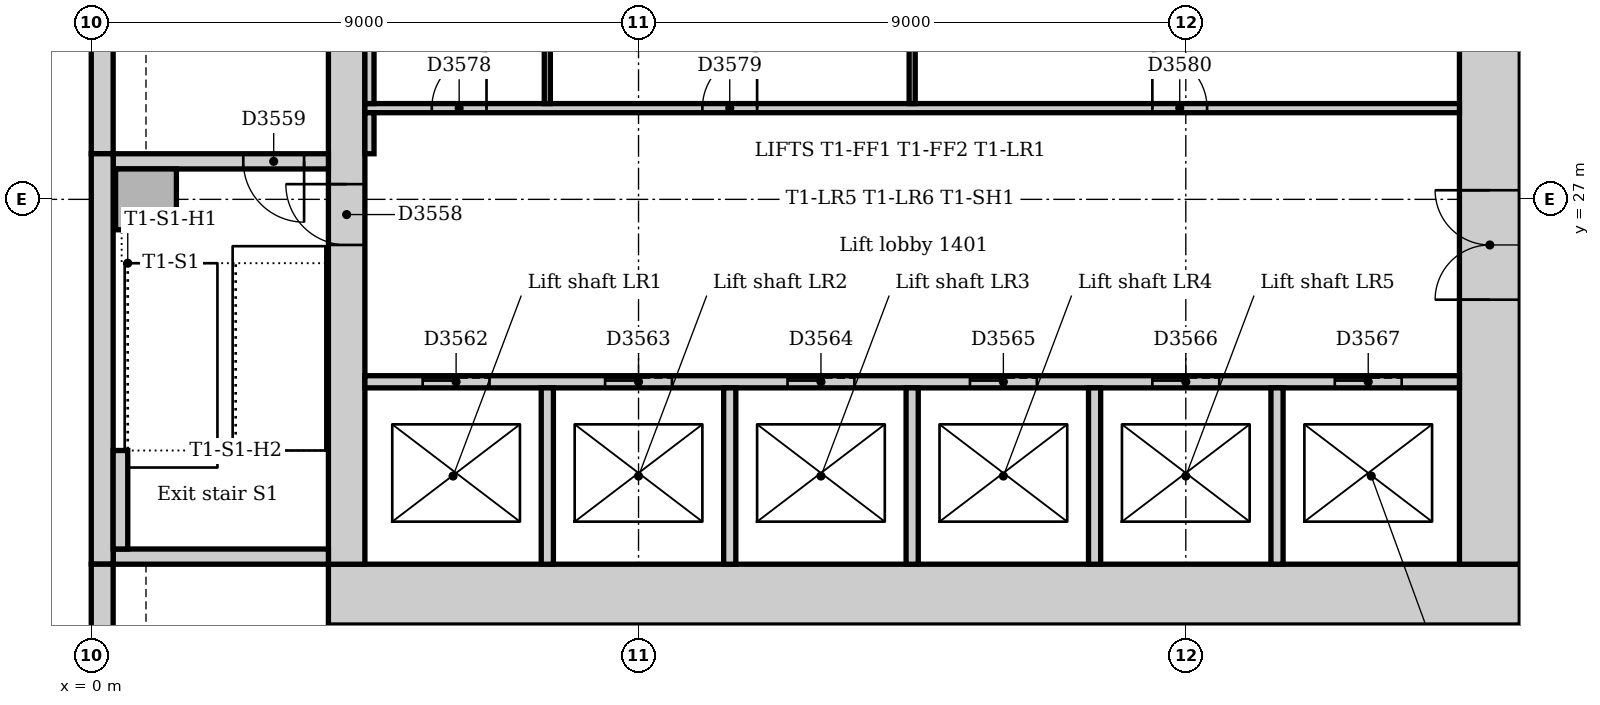
"""IFC4 building model, lengths in metres.
Left out: names, types, materials, properties, quantities, classifications, styles, units other than length and angle.
Written with IfcOpenShell. Run it as: python <this file> out.ifc"""

import sys

from ifc_helpers import new_model, si_unit, direction, frame, frame_2d, origin, origin_2d, place, context, subcontext, project, spatial, rectangle, extrude, element, fill, save


model = new_model("IFC4")
c1 = context("Model", 3, precision=1e-05, world=origin(), true_north=direction((0.0, 1.0)))
c2 = subcontext(c1, "Body", "Model", "MODEL_VIEW")
j1 = project(units=[si_unit("LENGTHUNIT", "METRE"), si_unit("PLANEANGLEUNIT", "RADIAN")], contexts=[c1])
p1 = place(None, origin())
s1 = spatial("IfcSite", under=j1, at=p1, CompositionType="ELEMENT")
p2 = place(p1, origin())
s2 = spatial("IfcBuilding", under=s1, at=p2, CompositionType="ELEMENT")
p3 = place(p2, frame((0.0, 0.0, 63.0)))
s3 = spatial("IfcBuildingStorey", under=s2, at=p3, CompositionType="ELEMENT", Elevation=63.0)
p4 = place(p3, frame((3.9, 20.5, 0.0), z_axis=(0.0, 0.0, 1.0), x_axis=(1.0, 0.0, 0.0)))
e1 = element("IfcWall", 1, at=p4, inside=s3, PredefinedType="SOLIDWALL", context=c2, shape_type="SweptSolid", body=[
    extrude(rectangle(XDim=19.6, YDim=1.0, at=frame_2d((9.8, 0.0))), origin(), (0.0, 0.0, 1.0), 4.0),
])
p5 = place(p3, frame((23.0, 21.0, 0.0), z_axis=(0.0, 0.0, 1.0), x_axis=(0.0, 1.0, 0.0)))
e2 = element("IfcWall", 2, at=p5, inside=s3, PredefinedType="SOLIDWALL", context=c2, shape_type="SweptSolid", body=[
    extrude(rectangle(XDim=10.5, YDim=1.0, at=frame_2d((5.25, 0.0))), origin(), (0.0, 0.0, 1.0), 4.0),
])
p6 = place(p5, frame((4.35, 0.0, 0.0)))
e3 = element("IfcOpeningElement", 3, at=p6, cuts=e2, PredefinedType="OPENING", context=c2, shape_type="SweptSolid", body=[
    extrude(rectangle(XDim=1.8, YDim=2.1, at=frame_2d((0.9, 1.05))), frame((0.0, 0.51, 0.0), z_axis=(0.0, -1.0, 0.0), x_axis=(1.0, 0.0, 0.0)), (0.0, 0.0, 1.0), 1.02),
])
p7 = place(p3, frame((4.2, 31.5, 0.0), z_axis=(0.0, 0.0, 1.0), x_axis=(0.0, -1.0, 0.0)))
e4 = element("IfcWall", 4, at=p7, inside=s3, PredefinedType="SOLIDWALL", context=c2, shape_type="SweptSolid", body=[
    extrude(rectangle(XDim=10.5, YDim=0.6, at=frame_2d((5.25, 0.0))), origin(), (0.0, 0.0, 1.0), 4.0),
])
p8 = place(p7, frame((4.25, 0.0, 0.0)))
e5 = element("IfcOpeningElement", 5, at=p8, cuts=e4, PredefinedType="OPENING", context=c2, shape_type="SweptSolid", body=[
    extrude(rectangle(XDim=1.0, YDim=2.1, at=frame_2d((0.5, 1.05))), frame((0.0, 0.31, 0.0), z_axis=(0.0, -1.0, 0.0), x_axis=(1.0, 0.0, 0.0)), (0.0, 0.0, 1.0), 0.62),
])
p9 = place(p3, frame((0.36, 21.125, 0.0), z_axis=(0.0, 0.0, 1.0), x_axis=(1.0, 0.0, 0.0)))
e6 = element("IfcWall", 6, at=p9, inside=s3, PredefinedType="SOLIDWALL", context=c2, shape_type="SweptSolid", body=[
    extrude(rectangle(XDim=3.54, YDim=0.25, at=frame_2d((1.77, 0.0))), origin(), (0.0, 0.0, 1.0), 4.0),
])
p10 = place(p3, frame((3.9, 27.625, 0.0), z_axis=(0.0, 0.0, 1.0), x_axis=(-1.0, 0.0, 0.0)))
e7 = element("IfcWall", 7, at=p10, inside=s3, PredefinedType="SOLIDWALL", context=c2, shape_type="SweptSolid", body=[
    extrude(rectangle(XDim=3.54, YDim=0.25, at=frame_2d((1.77, 0.0))), origin(), (0.0, 0.0, 1.0), 4.0),
])
p11 = place(p10, frame((0.4, 0.0, 0.0)))
e8 = element("IfcOpeningElement", 8, at=p11, cuts=e7, PredefinedType="OPENING", context=c2, shape_type="SweptSolid", body=[
    extrude(rectangle(XDim=1.0, YDim=2.1, at=frame_2d((0.5, 1.05))), frame((0.0, 0.135, 0.0), z_axis=(0.0, -1.0, 0.0), x_axis=(1.0, 0.0, 0.0)), (0.0, 0.0, 1.0), 0.27),
])
p12 = place(p3, frame((0.9, 27.0, 0.0), z_axis=(0.0, 0.0, 1.0), x_axis=(1.0, 0.0, 0.0)))
e9 = element("IfcColumn", 9, at=p12, inside=s3, PredefinedType="COLUMN", context=c2, shape_type="SweptSolid", body=[
    extrude(rectangle(XDim=1.0, YDim=1.0, at=origin_2d()), origin(), (0.0, 0.0, 1.0), 4.0),
])
p13 = place(p3, frame((0.18, 35.25, 0.0), z_axis=(0.0, 0.0, 1.0), x_axis=(0.0, -1.0, 0.0)))
e10 = element("IfcWall", 10, at=p13, inside=s3, PredefinedType="STANDARD", context=c2, shape_type="SweptSolid", body=[
    extrude(rectangle(XDim=7.5, YDim=0.36, at=frame_2d((3.75, 0.0))), origin(), (0.0, 0.0, 1.0), 3.85),
])
p14 = place(p3, frame((0.18, 27.75, 0.0), z_axis=(0.0, 0.0, 1.0), x_axis=(0.0, -1.0, 0.0)))
e11 = element("IfcWall", 11, at=p14, inside=s3, PredefinedType="STANDARD", context=c2, shape_type="SweptSolid", body=[
    extrude(rectangle(XDim=6.75, YDim=0.36, at=frame_2d((3.375, 0.0))), origin(), (0.0, 0.0, 1.0), 3.85),
])
p15 = place(p3, frame((0.18, 21.0, 0.0), z_axis=(0.0, 0.0, 1.0), x_axis=(0.0, -1.0, 0.0)))
e12 = element("IfcWall", 12, at=p15, inside=s3, PredefinedType="STANDARD", context=c2, shape_type="SweptSolid", body=[
    extrude(rectangle(XDim=16.757, YDim=0.36, at=frame_2d((8.379, 0.0))), origin(), (0.0, 0.0, 1.0), 3.85),
])
p16 = place(p15, frame((1.35, 0.0, 0.9)))
e13 = element("IfcOpeningElement", 13, at=p16, cuts=e12, PredefinedType="OPENING", context=c2, shape_type="SweptSolid", body=[
    extrude(rectangle(XDim=3.3, YDim=1.6, at=frame_2d((1.65, 0.8))), frame((0.0, 0.19, 0.0), z_axis=(0.0, -1.0, 0.0), x_axis=(1.0, 0.0, 0.0)), (0.0, 0.0, 1.0), 0.38),
])
p17 = place(p15, frame((5.85, 0.0, 0.9)))
e14 = element("IfcOpeningElement", 14, at=p17, cuts=e12, PredefinedType="OPENING", context=c2, shape_type="SweptSolid", body=[
    extrude(rectangle(XDim=3.3, YDim=1.6, at=frame_2d((1.65, 0.8))), frame((0.0, 0.19, 0.0), z_axis=(0.0, -1.0, 0.0), x_axis=(1.0, 0.0, 0.0)), (0.0, 0.0, 1.0), 0.38),
])
p18 = place(p15, frame((10.35, 0.0, 0.9)))
e15 = element("IfcOpeningElement", 15, at=p18, cuts=e12, PredefinedType="OPENING", context=c2, shape_type="SweptSolid", body=[
    extrude(rectangle(XDim=3.3, YDim=1.6, at=frame_2d((1.65, 0.8))), frame((0.0, 0.19, 0.0), z_axis=(0.0, -1.0, 0.0), x_axis=(1.0, 0.0, 0.0)), (0.0, 0.0, 1.0), 0.38),
])
p19 = place(p3, frame((0.48, 21.25, 0.0), z_axis=(0.0, 0.0, 1.0), x_axis=(0.0, 1.0, 0.0)))
e16 = element("IfcWall", 16, at=p19, inside=s3, PredefinedType="STANDARD", context=c2, shape_type="SweptSolid", body=[
    extrude(rectangle(XDim=1.62, YDim=0.24, at=frame_2d((0.81, 0.0))), origin(), (0.0, 0.0, 1.0), 4.0),
])
p20 = place(p3, frame((4.5, 24.0, 0.0), z_axis=(0.0, 0.0, 1.0), x_axis=(1.0, 0.0, 0.0)))
e17 = element("IfcWall", 17, at=p20, inside=s3, PredefinedType="PARTITIONING", context=c2, shape_type="SweptSolid", body=[
    extrude(rectangle(XDim=18.0, YDim=0.2, at=frame_2d((9.0, 0.0))), origin(), (0.0, 0.0, 1.0), 3.85),
])
p21 = place(p20, frame((0.95, 0.0, 0.0)))
e18 = element("IfcOpeningElement", 18, at=p21, cuts=e17, PredefinedType="OPENING", context=c2, shape_type="SweptSolid", body=[
    extrude(rectangle(XDim=1.1, YDim=2.1, at=frame_2d((0.55, 1.05))), frame((0.0, 0.11, 0.0), z_axis=(0.0, -1.0, 0.0), x_axis=(1.0, 0.0, 0.0)), (0.0, 0.0, 1.0), 0.22),
])
p22 = place(p20, frame((3.95, 0.0, 0.0)))
e19 = element("IfcOpeningElement", 19, at=p22, cuts=e17, PredefinedType="OPENING", context=c2, shape_type="SweptSolid", body=[
    extrude(rectangle(XDim=1.1, YDim=2.1, at=frame_2d((0.55, 1.05))), frame((0.0, 0.11, 0.0), z_axis=(0.0, -1.0, 0.0), x_axis=(1.0, 0.0, 0.0)), (0.0, 0.0, 1.0), 0.22),
])
p23 = place(p20, frame((6.95, 0.0, 0.0)))
e20 = element("IfcOpeningElement", 20, at=p23, cuts=e17, PredefinedType="OPENING", context=c2, shape_type="SweptSolid", body=[
    extrude(rectangle(XDim=1.1, YDim=2.1, at=frame_2d((0.55, 1.05))), frame((0.0, 0.11, 0.0), z_axis=(0.0, -1.0, 0.0), x_axis=(1.0, 0.0, 0.0)), (0.0, 0.0, 1.0), 0.22),
])
p24 = place(p20, frame((9.95, 0.0, 0.0)))
e21 = element("IfcOpeningElement", 21, at=p24, cuts=e17, PredefinedType="OPENING", context=c2, shape_type="SweptSolid", body=[
    extrude(rectangle(XDim=1.1, YDim=2.1, at=frame_2d((0.55, 1.05))), frame((0.0, 0.11, 0.0), z_axis=(0.0, -1.0, 0.0), x_axis=(1.0, 0.0, 0.0)), (0.0, 0.0, 1.0), 0.22),
])
p25 = place(p20, frame((12.95, 0.0, 0.0)))
e22 = element("IfcOpeningElement", 22, at=p25, cuts=e17, PredefinedType="OPENING", context=c2, shape_type="SweptSolid", body=[
    extrude(rectangle(XDim=1.1, YDim=2.1, at=frame_2d((0.55, 1.05))), frame((0.0, 0.11, 0.0), z_axis=(0.0, -1.0, 0.0), x_axis=(1.0, 0.0, 0.0)), (0.0, 0.0, 1.0), 0.22),
])
p26 = place(p20, frame((15.95, 0.0, 0.0)))
e23 = element("IfcOpeningElement", 23, at=p26, cuts=e17, PredefinedType="OPENING", context=c2, shape_type="SweptSolid", body=[
    extrude(rectangle(XDim=1.1, YDim=2.1, at=frame_2d((0.55, 1.05))), frame((0.0, 0.11, 0.0), z_axis=(0.0, -1.0, 0.0), x_axis=(1.0, 0.0, 0.0)), (0.0, 0.0, 1.0), 0.22),
])
for number, where, z_axis, x_axis in (
    (24, (7.5, 21.0, 0.0), (0.0, 0.0, 1.0), (0.0, 1.0, 0.0)),
    (25, (10.5, 21.0, 0.0), (0.0, 0.0, 1.0), (0.0, 1.0, 0.0)),
    (26, (13.5, 21.0, 0.0), (0.0, 0.0, 1.0), (0.0, 1.0, 0.0)),
    (27, (16.5, 21.0, 0.0), (0.0, 0.0, 1.0), (0.0, 1.0, 0.0)),
    (28, (19.5, 21.0, 0.0), (0.0, 0.0, 1.0), (0.0, 1.0, 0.0)),
):
    element("IfcWall", number, at=place(p3, frame(where, z_axis=z_axis, x_axis=x_axis)), inside=s3, PredefinedType="PARTITIONING", context=c2, shape_type="SweptSolid", body=[
        extrude(rectangle(XDim=2.9, YDim=0.2, at=frame_2d((1.45, 0.0))), origin(), (0.0, 0.0, 1.0), 3.85),
    ])
p27 = place(p3, frame((4.5, 28.5, 0.0), z_axis=(0.0, 0.0, 1.0), x_axis=(1.0, 0.0, 0.0)))
e29 = element("IfcWall", 29, at=p27, inside=s3, PredefinedType="PARTITIONING", context=c2, shape_type="SweptSolid", body=[
    extrude(rectangle(XDim=18.0, YDim=0.15, at=frame_2d((9.0, 0.0))), origin(), (0.0, 0.0, 1.0), 3.85),
])
p28 = place(p27, frame((1.1, 0.0, 0.0)))
e30 = element("IfcOpeningElement", 30, at=p28, cuts=e29, PredefinedType="OPENING", context=c2, shape_type="SweptSolid", body=[
    extrude(rectangle(XDim=0.9, YDim=2.1, at=frame_2d((0.45, 1.05))), frame((0.0, 0.085, 0.0), z_axis=(0.0, -1.0, 0.0), x_axis=(1.0, 0.0, 0.0)), (0.0, 0.0, 1.0), 0.17),
])
p29 = place(p27, frame((5.55, 0.0, 0.0)))
e31 = element("IfcOpeningElement", 31, at=p29, cuts=e29, PredefinedType="OPENING", context=c2, shape_type="SweptSolid", body=[
    extrude(rectangle(XDim=0.9, YDim=2.1, at=frame_2d((0.45, 1.05))), frame((0.0, 0.085, 0.0), z_axis=(0.0, -1.0, 0.0), x_axis=(1.0, 0.0, 0.0)), (0.0, 0.0, 1.0), 0.17),
])
p30 = place(p27, frame((12.95, 0.0, 0.0)))
e32 = element("IfcOpeningElement", 32, at=p30, cuts=e29, PredefinedType="OPENING", context=c2, shape_type="SweptSolid", body=[
    extrude(rectangle(XDim=0.9, YDim=2.1, at=frame_2d((0.45, 1.05))), frame((0.0, 0.085, 0.0), z_axis=(0.0, -1.0, 0.0), x_axis=(1.0, 0.0, 0.0)), (0.0, 0.0, 1.0), 0.17),
])
p31 = place(p3, frame((4.575, 27.75, 0.0), z_axis=(0.0, 0.0, 1.0), x_axis=(0.0, 1.0, 0.0)))
e33 = element("IfcWall", 33, at=p31, inside=s3, PredefinedType="PARTITIONING", context=c2, shape_type="SweptSolid", body=[
    extrude(rectangle(XDim=0.675, YDim=0.15, at=frame_2d((0.338, 0.0))), origin(), (0.0, 0.0, 1.0), 3.85),
])
p32 = place(p3, frame((4.575, 28.575, 0.0), z_axis=(0.0, 0.0, 1.0), x_axis=(0.0, 1.0, 0.0)))
e34 = element("IfcWall", 34, at=p32, inside=s3, PredefinedType="PARTITIONING", context=c2, shape_type="SweptSolid", body=[
    extrude(rectangle(XDim=2.675, YDim=0.15, at=frame_2d((1.337, 0.0))), origin(), (0.0, 0.0, 1.0), 3.85),
])
for number, where, z_axis, x_axis in (
    (35, (7.5, 28.575, 0.0), (0.0, 0.0, 1.0), (0.0, 1.0, 0.0)),
    (36, (13.5, 28.575, 0.0), (0.0, 0.0, 1.0), (0.0, 1.0, 0.0)),
):
    element("IfcWall", number, at=place(p3, frame(where, z_axis=z_axis, x_axis=x_axis)), inside=s3, PredefinedType="PARTITIONING", context=c2, shape_type="SweptSolid", body=[
        extrude(rectangle(XDim=2.675, YDim=0.1, at=frame_2d((1.337, 0.0))), origin(), (0.0, 0.0, 1.0), 3.85),
    ])
p33 = place(p8, frame((1.0, 0.0, 0.0), z_axis=(0.0, 0.0, 1.0), x_axis=(-1.0, 0.0, 0.0)))
e37 = element("IfcDoor", 37, at=p33, inside=s3, OperationType="SINGLE_SWING_RIGHT", PredefinedType="DOOR", context=c2, shape_type="SweptSolid", body=[
    extrude(rectangle(XDim=1.0, YDim=2.1, at=frame_2d((0.5, 1.05))), frame((0.0, 0.025, 0.0), z_axis=(0.0, -1.0, 0.0), x_axis=(1.0, 0.0, 0.0)), (0.0, 0.0, 1.0), 0.05),
])
fill(e5, e37)
p34 = place(p11, origin())
e38 = element("IfcDoor", 38, at=p34, inside=s3, OperationType="SINGLE_SWING_LEFT", PredefinedType="DOOR", context=c2, shape_type="SweptSolid", body=[
    extrude(rectangle(XDim=1.0, YDim=2.1, at=frame_2d((0.5, 1.05))), frame((0.0, 0.025, 0.0), z_axis=(0.0, -1.0, 0.0), x_axis=(1.0, 0.0, 0.0)), (0.0, 0.0, 1.0), 0.05),
])
fill(e8, e38)
p35 = place(p21, origin())
e39 = element("IfcDoor", 39, at=p35, inside=s3, OperationType="SLIDING_TO_LEFT", PredefinedType="DOOR", context=c2, shape_type="SweptSolid", body=[
    extrude(rectangle(XDim=1.1, YDim=2.1, at=frame_2d((0.55, 1.05))), frame((0.0, 0.025, 0.0), z_axis=(0.0, -1.0, 0.0), x_axis=(1.0, 0.0, 0.0)), (0.0, 0.0, 1.0), 0.05),
])
fill(e18, e39)
p36 = place(p22, origin())
e40 = element("IfcDoor", 40, at=p36, inside=s3, OperationType="SLIDING_TO_LEFT", PredefinedType="DOOR", context=c2, shape_type="SweptSolid", body=[
    extrude(rectangle(XDim=1.1, YDim=2.1, at=frame_2d((0.55, 1.05))), frame((0.0, 0.025, 0.0), z_axis=(0.0, -1.0, 0.0), x_axis=(1.0, 0.0, 0.0)), (0.0, 0.0, 1.0), 0.05),
])
fill(e19, e40)
p37 = place(p23, origin())
e41 = element("IfcDoor", 41, at=p37, inside=s3, OperationType="SLIDING_TO_LEFT", PredefinedType="DOOR", context=c2, shape_type="SweptSolid", body=[
    extrude(rectangle(XDim=1.1, YDim=2.1, at=frame_2d((0.55, 1.05))), frame((0.0, 0.025, 0.0), z_axis=(0.0, -1.0, 0.0), x_axis=(1.0, 0.0, 0.0)), (0.0, 0.0, 1.0), 0.05),
])
fill(e20, e41)
p38 = place(p24, origin())
e42 = element("IfcDoor", 42, at=p38, inside=s3, OperationType="SLIDING_TO_LEFT", PredefinedType="DOOR", context=c2, shape_type="SweptSolid", body=[
    extrude(rectangle(XDim=1.1, YDim=2.1, at=frame_2d((0.55, 1.05))), frame((0.0, 0.025, 0.0), z_axis=(0.0, -1.0, 0.0), x_axis=(1.0, 0.0, 0.0)), (0.0, 0.0, 1.0), 0.05),
])
fill(e21, e42)
p39 = place(p25, origin())
e43 = element("IfcDoor", 43, at=p39, inside=s3, OperationType="SLIDING_TO_LEFT", PredefinedType="DOOR", context=c2, shape_type="SweptSolid", body=[
    extrude(rectangle(XDim=1.1, YDim=2.1, at=frame_2d((0.55, 1.05))), frame((0.0, 0.025, 0.0), z_axis=(0.0, -1.0, 0.0), x_axis=(1.0, 0.0, 0.0)), (0.0, 0.0, 1.0), 0.05),
])
fill(e22, e43)
p40 = place(p26, origin())
e44 = element("IfcDoor", 44, at=p40, inside=s3, OperationType="SLIDING_TO_LEFT", PredefinedType="DOOR", context=c2, shape_type="SweptSolid", body=[
    extrude(rectangle(XDim=1.1, YDim=2.1, at=frame_2d((0.55, 1.05))), frame((0.0, 0.025, 0.0), z_axis=(0.0, -1.0, 0.0), x_axis=(1.0, 0.0, 0.0)), (0.0, 0.0, 1.0), 0.05),
])
fill(e23, e44)
p41 = place(p6, origin())
e45 = element("IfcDoor", 45, at=p41, inside=s3, OperationType="DOUBLE_DOOR_DOUBLE_SWING", PredefinedType="DOOR", context=c2, shape_type="SweptSolid", body=[
    extrude(rectangle(XDim=1.8, YDim=2.1, at=frame_2d((0.9, 1.05))), frame((0.0, 0.025, 0.0), z_axis=(0.0, -1.0, 0.0), x_axis=(1.0, 0.0, 0.0)), (0.0, 0.0, 1.0), 0.05),
])
fill(e3, e45)
p42 = place(p28, origin())
e46 = element("IfcDoor", 46, at=p42, inside=s3, OperationType="SINGLE_SWING_RIGHT", PredefinedType="DOOR", context=c2, shape_type="SweptSolid", body=[
    extrude(rectangle(XDim=0.9, YDim=2.1, at=frame_2d((0.45, 1.05))), frame((0.0, 0.025, 0.0), z_axis=(0.0, -1.0, 0.0), x_axis=(1.0, 0.0, 0.0)), (0.0, 0.0, 1.0), 0.05),
])
fill(e30, e46)
p43 = place(p29, origin())
e47 = element("IfcDoor", 47, at=p43, inside=s3, OperationType="SINGLE_SWING_RIGHT", PredefinedType="DOOR", context=c2, shape_type="SweptSolid", body=[
    extrude(rectangle(XDim=0.9, YDim=2.1, at=frame_2d((0.45, 1.05))), frame((0.0, 0.025, 0.0), z_axis=(0.0, -1.0, 0.0), x_axis=(1.0, 0.0, 0.0)), (0.0, 0.0, 1.0), 0.05),
])
fill(e31, e47)
p44 = place(p30, origin())
e48 = element("IfcDoor", 48, at=p44, inside=s3, OperationType="SINGLE_SWING_LEFT", PredefinedType="DOOR", context=c2, shape_type="SweptSolid", body=[
    extrude(rectangle(XDim=0.9, YDim=2.1, at=frame_2d((0.45, 1.05))), frame((0.0, 0.025, 0.0), z_axis=(0.0, -1.0, 0.0), x_axis=(1.0, 0.0, 0.0)), (0.0, 0.0, 1.0), 0.05),
])
fill(e32, e48)
save(model, sys.argv[1])
